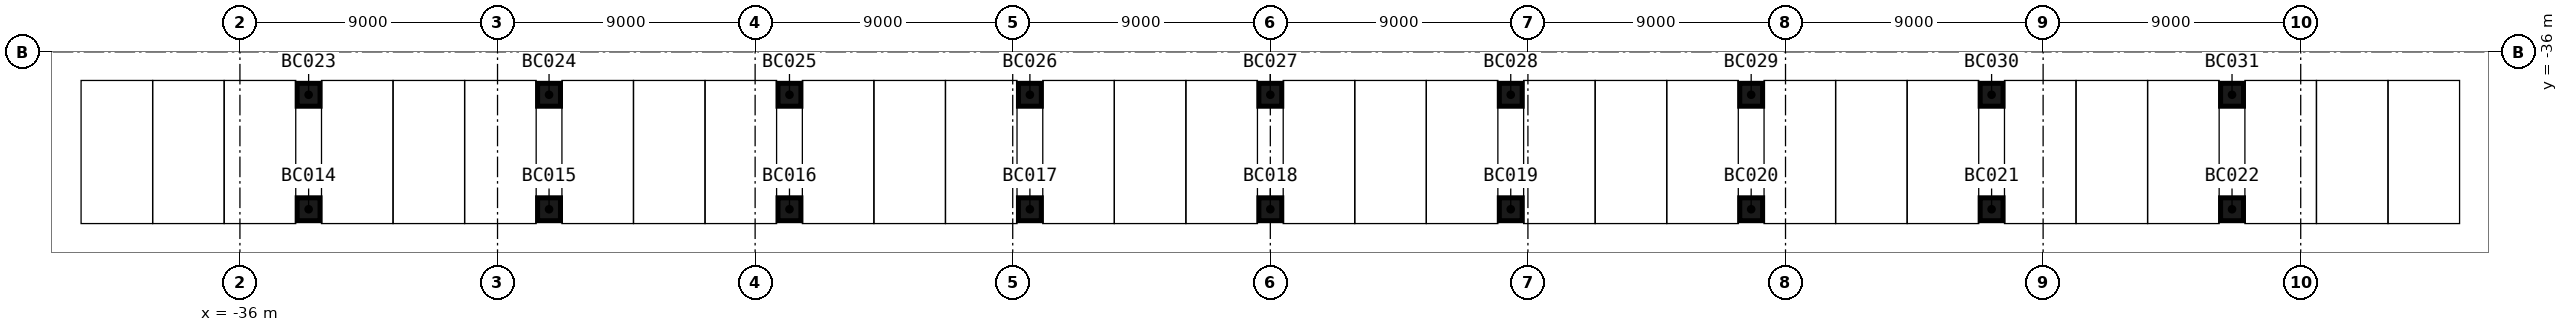
"""IFC4 building model, lengths in metres.
Left out: names, types, materials, properties, quantities, classifications, styles, units other than length and angle.
Written with IfcOpenShell. Run it as: python <this file> out.ifc"""

import sys

from ifc_helpers import new_model, si_unit, direction, frame, origin, origin_2d, place, context, subcontext, project, spatial, rectangle, extrude, element, save


model = new_model("IFC4")
c1 = context("Model", 3, precision=1e-05, world=origin(), true_north=direction((0.0, 1.0)))
c2 = subcontext(c1, "Body", "Model", "MODEL_VIEW")
j1 = project(units=[si_unit("LENGTHUNIT", "METRE"), si_unit("PLANEANGLEUNIT", "RADIAN")], contexts=[c1])
p1 = place(None, origin())
s1 = spatial("IfcSite", under=j1, at=p1, CompositionType="ELEMENT")
p2 = place(p1, origin())
s2 = spatial("IfcBuilding", under=s1, at=p2, CompositionType="ELEMENT")
p3 = place(p2, frame((0.0, 0.0, -7.8)))
s3 = spatial("IfcBuildingStorey", under=s2, at=p3, CompositionType="ELEMENT", Elevation=-7.8)
for number, where, z_axis, x_axis in (
    (1, (-33.6, -41.5, 0.0), (0.0, 0.0, 1.0), (1.0, 0.0, 0.0)),
    (2, (-25.2, -41.5, 0.0), (0.0, 0.0, 1.0), (1.0, 0.0, 0.0)),
    (3, (-16.8, -41.5, 0.0), (0.0, 0.0, 1.0), (1.0, 0.0, 0.0)),
    (4, (-8.4, -41.5, 0.0), (0.0, 0.0, 1.0), (1.0, 0.0, 0.0)),
    (5, (0.0, -41.5, 0.0), (0.0, 0.0, 1.0), (1.0, 0.0, 0.0)),
    (6, (8.4, -41.5, 0.0), (0.0, 0.0, 1.0), (1.0, 0.0, 0.0)),
    (7, (16.8, -41.5, 0.0), (0.0, 0.0, 1.0), (1.0, 0.0, 0.0)),
    (8, (25.2, -41.5, 0.0), (0.0, 0.0, 1.0), (1.0, 0.0, 0.0)),
    (9, (33.6, -41.5, 0.0), (0.0, 0.0, 1.0), (1.0, 0.0, 0.0)),
    (10, (-33.6, -37.5, 0.0), (0.0, 0.0, 1.0), (1.0, 0.0, 0.0)),
    (11, (-25.2, -37.5, 0.0), (0.0, 0.0, 1.0), (1.0, 0.0, 0.0)),
    (12, (-16.8, -37.5, 0.0), (0.0, 0.0, 1.0), (1.0, 0.0, 0.0)),
    (13, (-8.4, -37.5, 0.0), (0.0, 0.0, 1.0), (1.0, 0.0, 0.0)),
    (14, (0.0, -37.5, 0.0), (0.0, 0.0, 1.0), (1.0, 0.0, 0.0)),
    (15, (8.4, -37.5, 0.0), (0.0, 0.0, 1.0), (1.0, 0.0, 0.0)),
    (16, (16.8, -37.5, 0.0), (0.0, 0.0, 1.0), (1.0, 0.0, 0.0)),
    (17, (25.2, -37.5, 0.0), (0.0, 0.0, 1.0), (1.0, 0.0, 0.0)),
    (18, (33.6, -37.5, 0.0), (0.0, 0.0, 1.0), (1.0, 0.0, 0.0)),
):
    element("IfcColumn", number, at=place(p3, frame(where, z_axis=z_axis, x_axis=x_axis)), inside=s3, PredefinedType="COLUMN", context=c2, shape_type="SweptSolid", body=[
        extrude(rectangle(XDim=0.8, YDim=0.8, at=origin_2d()), origin(), (0.0, 0.0, 1.0), 3.9),
    ])
save(model, sys.argv[1])
